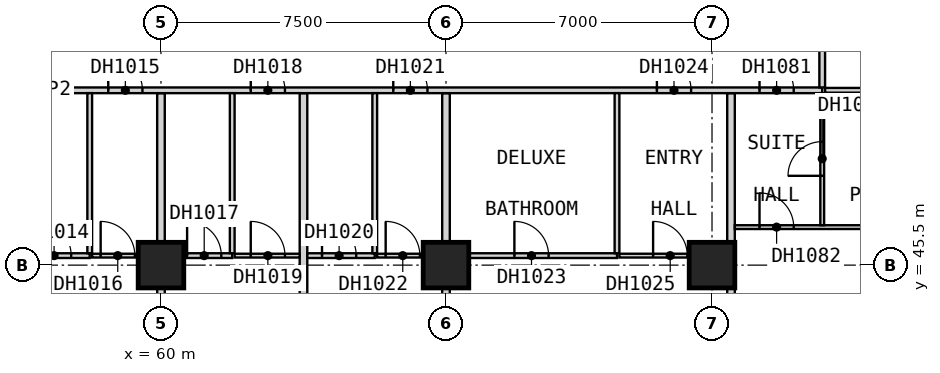
"""IFC4 building model, lengths in metres.
Left out: names, types, materials, properties, quantities, classifications, styles, units other than length and angle.
Written with IfcOpenShell. Run it as: python <this file> out.ifc"""

import sys

from ifc_helpers import new_model, si_unit, direction, frame, frame_2d, origin, origin_2d, place, context, subcontext, project, spatial, rectangle, extrude, element, fill, save


model = new_model("IFC4")
c1 = context("Model", 3, precision=1e-05, world=origin(), true_north=direction((0.0, 1.0)))
c2 = subcontext(c1, "Body", "Model", "MODEL_VIEW")
j1 = project(units=[si_unit("LENGTHUNIT", "METRE"), si_unit("PLANEANGLEUNIT", "RADIAN")], contexts=[c1])
p1 = place(None, origin())
s1 = spatial("IfcSite", under=j1, at=p1, CompositionType="ELEMENT")
p2 = place(p1, origin())
s2 = spatial("IfcBuilding", under=s1, at=p2, CompositionType="ELEMENT")
p3 = place(p2, frame((0.0, 0.0, 48.4)))
s3 = spatial("IfcBuildingStorey", under=s2, at=p3, CompositionType="ELEMENT", Elevation=48.4)
for number, where, z_axis, x_axis in (
    (1, (60.0, 45.5, 0.0), (0.0, 0.0, 1.0), (1.0, 0.0, 0.0)),
    (2, (67.5, 45.5, 0.0), (0.0, 0.0, 1.0), (1.0, 0.0, 0.0)),
    (3, (74.5, 45.5, 0.0), (0.0, 0.0, 1.0), (1.0, 0.0, 0.0)),
):
    element("IfcColumn", number, at=place(p3, frame(where, z_axis=z_axis, x_axis=x_axis)), inside=s3, PredefinedType="COLUMN", context=c2, shape_type="SweptSolid", body=[
        extrude(rectangle(XDim=1.2, YDim=1.2, at=origin_2d()), origin(), (0.0, 0.0, 1.0), 3.6),
    ])
p4 = place(p3, frame((60.0, 37.5, 0.0), z_axis=(0.0, 0.0, 1.0), x_axis=(0.0, 1.0, 0.0)))
e4 = element("IfcWall", 4, at=p4, inside=s3, PredefinedType="PARTITIONING", context=c2, shape_type="SweptSolid", body=[
    extrude(rectangle(XDim=12.525, YDim=0.2, at=frame_2d((6.262, 0.0))), origin(), (0.0, 0.0, 1.0), 3.35),
])
p5 = place(p3, frame((63.75, 38.31, 0.0), z_axis=(0.0, 0.0, 1.0), x_axis=(0.0, 1.0, 0.0)))
e5 = element("IfcWall", 5, at=p5, inside=s3, PredefinedType="PARTITIONING", context=c2, shape_type="SweptSolid", body=[
    extrude(rectangle(XDim=11.715, YDim=0.2, at=frame_2d((5.857, 0.0))), origin(), (0.0, 0.0, 1.0), 3.35),
])
p6 = place(p3, frame((67.5, 37.5, 0.0), z_axis=(0.0, 0.0, 1.0), x_axis=(0.0, 1.0, 0.0)))
e6 = element("IfcWall", 6, at=p6, inside=s3, PredefinedType="PARTITIONING", context=c2, shape_type="SweptSolid", body=[
    extrude(rectangle(XDim=12.525, YDim=0.2, at=frame_2d((6.262, 0.0))), origin(), (0.0, 0.0, 1.0), 3.35),
])
p7 = place(p3, frame((75.0, 38.31, 0.0), z_axis=(0.0, 0.0, 1.0), x_axis=(0.0, 1.0, 0.0)))
e7 = element("IfcWall", 7, at=p7, inside=s3, PredefinedType="PARTITIONING", context=c2, shape_type="SweptSolid", body=[
    extrude(rectangle(XDim=11.715, YDim=0.2, at=frame_2d((5.857, 0.0))), origin(), (0.0, 0.0, 1.0), 3.35),
])
p8 = place(p3, frame((33.75, 50.1, 0.0), z_axis=(0.0, 0.0, 1.0), x_axis=(1.0, 0.0, 0.0)))
e8 = element("IfcWall", 8, at=p8, inside=s3, PredefinedType="PARTITIONING", context=c2, shape_type="SweptSolid", body=[
    extrude(rectangle(XDim=43.65, YDim=0.15, at=frame_2d((21.825, 0.0))), origin(), (0.0, 0.0, 1.0), 3.35),
])
p9 = place(p8, frame((5.175, 0.0, 0.0)))
e9 = element("IfcOpeningElement", 9, at=p9, cuts=e8, PredefinedType="OPENING", context=c2, shape_type="SweptSolid", body=[
    extrude(rectangle(XDim=0.9, YDim=2.1, at=frame_2d((0.45, 1.05))), frame((0.0, 0.085, 0.0), z_axis=(0.0, -1.0, 0.0), x_axis=(1.0, 0.0, 0.0)), (0.0, 0.0, 1.0), 0.17),
])
p10 = place(p8, frame((13.05, 0.0, 0.0)))
e10 = element("IfcOpeningElement", 10, at=p10, cuts=e8, PredefinedType="OPENING", context=c2, shape_type="SweptSolid", body=[
    extrude(rectangle(XDim=0.9, YDim=2.1, at=frame_2d((0.45, 1.05))), frame((0.0, 0.085, 0.0), z_axis=(0.0, -1.0, 0.0), x_axis=(1.0, 0.0, 0.0)), (0.0, 0.0, 1.0), 0.17),
])
p11 = place(p8, frame((17.363, 0.0, 0.0)))
e11 = element("IfcOpeningElement", 11, at=p11, cuts=e8, PredefinedType="OPENING", context=c2, shape_type="SweptSolid", body=[
    extrude(rectangle(XDim=0.9, YDim=2.1, at=frame_2d((0.45, 1.05))), frame((0.0, 0.085, 0.0), z_axis=(0.0, -1.0, 0.0), x_axis=(1.0, 0.0, 0.0)), (0.0, 0.0, 1.0), 0.17),
])
p12 = place(p8, frame((21.113, 0.0, 0.0)))
e12 = element("IfcOpeningElement", 12, at=p12, cuts=e8, PredefinedType="OPENING", context=c2, shape_type="SweptSolid", body=[
    extrude(rectangle(XDim=0.9, YDim=2.1, at=frame_2d((0.45, 1.05))), frame((0.0, 0.085, 0.0), z_axis=(0.0, -1.0, 0.0), x_axis=(1.0, 0.0, 0.0)), (0.0, 0.0, 1.0), 0.17),
])
p13 = place(p8, frame((24.863, 0.0, 0.0)))
e13 = element("IfcOpeningElement", 13, at=p13, cuts=e8, PredefinedType="OPENING", context=c2, shape_type="SweptSolid", body=[
    extrude(rectangle(XDim=0.9, YDim=2.1, at=frame_2d((0.45, 1.05))), frame((0.0, 0.085, 0.0), z_axis=(0.0, -1.0, 0.0), x_axis=(1.0, 0.0, 0.0)), (0.0, 0.0, 1.0), 0.17),
])
p14 = place(p8, frame((28.613, 0.0, 0.0)))
e14 = element("IfcOpeningElement", 14, at=p14, cuts=e8, PredefinedType="OPENING", context=c2, shape_type="SweptSolid", body=[
    extrude(rectangle(XDim=0.9, YDim=2.1, at=frame_2d((0.45, 1.05))), frame((0.0, 0.085, 0.0), z_axis=(0.0, -1.0, 0.0), x_axis=(1.0, 0.0, 0.0)), (0.0, 0.0, 1.0), 0.17),
])
p15 = place(p8, frame((32.363, 0.0, 0.0)))
e15 = element("IfcOpeningElement", 15, at=p15, cuts=e8, PredefinedType="OPENING", context=c2, shape_type="SweptSolid", body=[
    extrude(rectangle(XDim=0.9, YDim=2.1, at=frame_2d((0.45, 1.05))), frame((0.0, 0.085, 0.0), z_axis=(0.0, -1.0, 0.0), x_axis=(1.0, 0.0, 0.0)), (0.0, 0.0, 1.0), 0.17),
])
p16 = place(p8, frame((39.3, 0.0, 0.0)))
e16 = element("IfcOpeningElement", 16, at=p16, cuts=e8, PredefinedType="OPENING", context=c2, shape_type="SweptSolid", body=[
    extrude(rectangle(XDim=0.9, YDim=2.1, at=frame_2d((0.45, 1.05))), frame((0.0, 0.085, 0.0), z_axis=(0.0, -1.0, 0.0), x_axis=(1.0, 0.0, 0.0)), (0.0, 0.0, 1.0), 0.17),
])
p17 = place(p8, frame((42.0, 0.0, 0.0)))
e17 = element("IfcOpeningElement", 17, at=p17, cuts=e8, PredefinedType="OPENING", context=c2, shape_type="SweptSolid", body=[
    extrude(rectangle(XDim=0.9, YDim=2.1, at=frame_2d((0.45, 1.05))), frame((0.0, 0.085, 0.0), z_axis=(0.0, -1.0, 0.0), x_axis=(1.0, 0.0, 0.0)), (0.0, 0.0, 1.0), 0.17),
])
p18 = place(p3, frame((77.4, 50.175, 0.0), z_axis=(0.0, 0.0, 1.0), x_axis=(0.0, 1.0, 0.0)))
e18 = element("IfcWall", 18, at=p18, inside=s3, PredefinedType="PARTITIONING", context=c2, shape_type="SweptSolid", body=[
    extrude(rectangle(XDim=42.15, YDim=0.15, at=frame_2d((21.075, 0.0))), origin(), (0.0, 0.0, 1.0), 3.35),
])
p19 = place(p18, frame((4.688, 0.0, 0.0)))
e19 = element("IfcOpeningElement", 19, at=p19, cuts=e18, PredefinedType="OPENING", context=c2, shape_type="SweptSolid", body=[
    extrude(rectangle(XDim=0.9, YDim=2.1, at=frame_2d((0.45, 1.05))), frame((0.0, 0.085, 0.0), z_axis=(0.0, -1.0, 0.0), x_axis=(1.0, 0.0, 0.0)), (0.0, 0.0, 1.0), 0.17),
])
p20 = place(p18, frame((8.438, 0.0, 0.0)))
e20 = element("IfcOpeningElement", 20, at=p20, cuts=e18, PredefinedType="OPENING", context=c2, shape_type="SweptSolid", body=[
    extrude(rectangle(XDim=0.9, YDim=2.1, at=frame_2d((0.45, 1.05))), frame((0.0, 0.085, 0.0), z_axis=(0.0, -1.0, 0.0), x_axis=(1.0, 0.0, 0.0)), (0.0, 0.0, 1.0), 0.17),
])
p21 = place(p18, frame((12.188, 0.0, 0.0)))
e21 = element("IfcOpeningElement", 21, at=p21, cuts=e18, PredefinedType="OPENING", context=c2, shape_type="SweptSolid", body=[
    extrude(rectangle(XDim=0.9, YDim=2.1, at=frame_2d((0.45, 1.05))), frame((0.0, 0.085, 0.0), z_axis=(0.0, -1.0, 0.0), x_axis=(1.0, 0.0, 0.0)), (0.0, 0.0, 1.0), 0.17),
])
p22 = place(p18, frame((15.938, 0.0, 0.0)))
e22 = element("IfcOpeningElement", 22, at=p22, cuts=e18, PredefinedType="OPENING", context=c2, shape_type="SweptSolid", body=[
    extrude(rectangle(XDim=0.9, YDim=2.1, at=frame_2d((0.45, 1.05))), frame((0.0, 0.085, 0.0), z_axis=(0.0, -1.0, 0.0), x_axis=(1.0, 0.0, 0.0)), (0.0, 0.0, 1.0), 0.17),
])
p23 = place(p18, frame((19.688, 0.0, 0.0)))
e23 = element("IfcOpeningElement", 23, at=p23, cuts=e18, PredefinedType="OPENING", context=c2, shape_type="SweptSolid", body=[
    extrude(rectangle(XDim=0.9, YDim=2.1, at=frame_2d((0.45, 1.05))), frame((0.0, 0.085, 0.0), z_axis=(0.0, -1.0, 0.0), x_axis=(1.0, 0.0, 0.0)), (0.0, 0.0, 1.0), 0.17),
])
p24 = place(p18, frame((23.438, 0.0, 0.0)))
e24 = element("IfcOpeningElement", 24, at=p24, cuts=e18, PredefinedType="OPENING", context=c2, shape_type="SweptSolid", body=[
    extrude(rectangle(XDim=0.9, YDim=2.1, at=frame_2d((0.45, 1.05))), frame((0.0, 0.085, 0.0), z_axis=(0.0, -1.0, 0.0), x_axis=(1.0, 0.0, 0.0)), (0.0, 0.0, 1.0), 0.17),
])
p25 = place(p18, frame((27.188, 0.0, 0.0)))
e25 = element("IfcOpeningElement", 25, at=p25, cuts=e18, PredefinedType="OPENING", context=c2, shape_type="SweptSolid", body=[
    extrude(rectangle(XDim=0.9, YDim=2.1, at=frame_2d((0.45, 1.05))), frame((0.0, 0.085, 0.0), z_axis=(0.0, -1.0, 0.0), x_axis=(1.0, 0.0, 0.0)), (0.0, 0.0, 1.0), 0.17),
])
p26 = place(p18, frame((30.938, 0.0, 0.0)))
e26 = element("IfcOpeningElement", 26, at=p26, cuts=e18, PredefinedType="OPENING", context=c2, shape_type="SweptSolid", body=[
    extrude(rectangle(XDim=0.9, YDim=2.1, at=frame_2d((0.45, 1.05))), frame((0.0, 0.085, 0.0), z_axis=(0.0, -1.0, 0.0), x_axis=(1.0, 0.0, 0.0)), (0.0, 0.0, 1.0), 0.17),
])
p27 = place(p18, frame((34.688, 0.0, 0.0)))
e27 = element("IfcOpeningElement", 27, at=p27, cuts=e18, PredefinedType="OPENING", context=c2, shape_type="SweptSolid", body=[
    extrude(rectangle(XDim=0.9, YDim=2.1, at=frame_2d((0.45, 1.05))), frame((0.0, 0.085, 0.0), z_axis=(0.0, -1.0, 0.0), x_axis=(1.0, 0.0, 0.0)), (0.0, 0.0, 1.0), 0.17),
])
p28 = place(p18, frame((38.438, 0.0, 0.0)))
e28 = element("IfcOpeningElement", 28, at=p28, cuts=e18, PredefinedType="OPENING", context=c2, shape_type="SweptSolid", body=[
    extrude(rectangle(XDim=0.9, YDim=2.1, at=frame_2d((0.45, 1.05))), frame((0.0, 0.085, 0.0), z_axis=(0.0, -1.0, 0.0), x_axis=(1.0, 0.0, 0.0)), (0.0, 0.0, 1.0), 0.17),
])
p29 = place(p3, frame((58.188, 45.75, 0.0), z_axis=(0.0, 0.0, 1.0), x_axis=(1.0, 0.0, 0.0)))
e29 = element("IfcWall", 29, at=p29, inside=s3, PredefinedType="PARTITIONING", context=c2, shape_type="SweptSolid", body=[
    extrude(rectangle(XDim=1.712, YDim=0.1, at=frame_2d((0.856, 0.0))), origin(), (0.0, 0.0, 1.0), 3.35),
])
p30 = place(p29, frame((0.225, 0.0, 0.0)))
e30 = element("IfcOpeningElement", 30, at=p30, cuts=e29, PredefinedType="OPENING", context=c2, shape_type="SweptSolid", body=[
    extrude(rectangle(XDim=0.9, YDim=2.1, at=frame_2d((0.45, 1.05))), frame((0.0, 0.06, 0.0), z_axis=(0.0, -1.0, 0.0), x_axis=(1.0, 0.0, 0.0)), (0.0, 0.0, 1.0), 0.12),
])
p31 = place(p3, frame((61.938, 45.75, 0.0), z_axis=(0.0, 0.0, 1.0), x_axis=(1.0, 0.0, 0.0)))
e31 = element("IfcWall", 31, at=p31, inside=s3, PredefinedType="PARTITIONING", context=c2, shape_type="SweptSolid", body=[
    extrude(rectangle(XDim=1.712, YDim=0.1, at=frame_2d((0.856, 0.0))), origin(), (0.0, 0.0, 1.0), 3.35),
])
p32 = place(p31, frame((0.425, 0.0, 0.0)))
e32 = element("IfcOpeningElement", 32, at=p32, cuts=e31, PredefinedType="OPENING", context=c2, shape_type="SweptSolid", body=[
    extrude(rectangle(XDim=0.9, YDim=2.1, at=frame_2d((0.45, 1.05))), frame((0.0, 0.06, 0.0), z_axis=(0.0, -1.0, 0.0), x_axis=(1.0, 0.0, 0.0)), (0.0, 0.0, 1.0), 0.12),
])
p33 = place(p3, frame((65.688, 45.75, 0.0), z_axis=(0.0, 0.0, 1.0), x_axis=(1.0, 0.0, 0.0)))
e33 = element("IfcWall", 33, at=p33, inside=s3, PredefinedType="PARTITIONING", context=c2, shape_type="SweptSolid", body=[
    extrude(rectangle(XDim=1.712, YDim=0.1, at=frame_2d((0.856, 0.0))), origin(), (0.0, 0.0, 1.0), 3.35),
])
p34 = place(p33, frame((0.225, 0.0, 0.0)))
e34 = element("IfcOpeningElement", 34, at=p34, cuts=e33, PredefinedType="OPENING", context=c2, shape_type="SweptSolid", body=[
    extrude(rectangle(XDim=0.9, YDim=2.1, at=frame_2d((0.45, 1.05))), frame((0.0, 0.06, 0.0), z_axis=(0.0, -1.0, 0.0), x_axis=(1.0, 0.0, 0.0)), (0.0, 0.0, 1.0), 0.12),
])
p35 = place(p3, frame((72.062, 45.75, 0.0), z_axis=(0.0, 0.0, 1.0), x_axis=(1.0, 0.0, 0.0)))
e35 = element("IfcWall", 35, at=p35, inside=s3, PredefinedType="PARTITIONING", context=c2, shape_type="SweptSolid", body=[
    extrude(rectangle(XDim=2.837, YDim=0.1, at=frame_2d((1.419, 0.0))), origin(), (0.0, 0.0, 1.0), 3.35),
])
p36 = place(p35, frame((0.887, 0.0, 0.0)))
e36 = element("IfcOpeningElement", 36, at=p36, cuts=e35, PredefinedType="OPENING", context=c2, shape_type="SweptSolid", body=[
    extrude(rectangle(XDim=0.9, YDim=2.1, at=frame_2d((0.45, 1.05))), frame((0.0, 0.06, 0.0), z_axis=(0.0, -1.0, 0.0), x_axis=(1.0, 0.0, 0.0)), (0.0, 0.0, 1.0), 0.12),
])
p37 = place(p3, frame((75.1, 46.5, 0.0), z_axis=(0.0, 0.0, 1.0), x_axis=(1.0, 0.0, 0.0)))
e37 = element("IfcWall", 37, at=p37, inside=s3, PredefinedType="PARTITIONING", context=c2, shape_type="SweptSolid", body=[
    extrude(rectangle(XDim=7.35, YDim=0.1, at=frame_2d((3.675, 0.0))), origin(), (0.0, 0.0, 1.0), 3.35),
])
p38 = place(p37, frame((0.65, 0.0, 0.0)))
e38 = element("IfcOpeningElement", 38, at=p38, cuts=e37, PredefinedType="OPENING", context=c2, shape_type="SweptSolid", body=[
    extrude(rectangle(XDim=0.9, YDim=2.1, at=frame_2d((0.45, 1.05))), frame((0.0, 0.06, 0.0), z_axis=(0.0, -1.0, 0.0), x_axis=(1.0, 0.0, 0.0)), (0.0, 0.0, 1.0), 0.12),
])
p39 = place(p3, frame((77.4, 46.55, 0.0), z_axis=(0.0, 0.0, 1.0), x_axis=(0.0, 1.0, 0.0)))
e39 = element("IfcWall", 39, at=p39, inside=s3, PredefinedType="PARTITIONING", context=c2, shape_type="SweptSolid", body=[
    extrude(rectangle(XDim=3.475, YDim=0.1, at=frame_2d((1.737, 0.0))), origin(), (0.0, 0.0, 1.0), 3.35),
])
p40 = place(p39, frame((1.3, 0.0, 0.0)))
e40 = element("IfcOpeningElement", 40, at=p40, cuts=e39, PredefinedType="OPENING", context=c2, shape_type="SweptSolid", body=[
    extrude(rectangle(XDim=0.9, YDim=2.1, at=frame_2d((0.45, 1.05))), frame((0.0, 0.06, 0.0), z_axis=(0.0, -1.0, 0.0), x_axis=(1.0, 0.0, 0.0)), (0.0, 0.0, 1.0), 0.12),
])
p41 = place(p3, frame((56.35, 45.75, 0.0), z_axis=(0.0, 0.0, 1.0), x_axis=(1.0, 0.0, 0.0)))
e41 = element("IfcWall", 41, at=p41, inside=s3, PredefinedType="PARTITIONING", context=c2, shape_type="SweptSolid", body=[
    extrude(rectangle(XDim=1.775, YDim=0.125, at=frame_2d((0.887, 0.0))), origin(), (0.0, 0.0, 1.0), 3.35),
])
p42 = place(p41, frame((0.387, 0.0, 0.0)))
e42 = element("IfcOpeningElement", 42, at=p42, cuts=e41, PredefinedType="OPENING", context=c2, shape_type="SweptSolid", body=[
    extrude(rectangle(XDim=0.9, YDim=2.1, at=frame_2d((0.45, 1.05))), frame((0.0, 0.073, 0.0), z_axis=(0.0, -1.0, 0.0), x_axis=(1.0, 0.0, 0.0)), (0.0, 0.0, 1.0), 0.145),
])
p43 = place(p3, frame((60.1, 45.75, 0.0), z_axis=(0.0, 0.0, 1.0), x_axis=(1.0, 0.0, 0.0)))
e43 = element("IfcWall", 43, at=p43, inside=s3, PredefinedType="PARTITIONING", context=c2, shape_type="SweptSolid", body=[
    extrude(rectangle(XDim=1.775, YDim=0.125, at=frame_2d((0.887, 0.0))), origin(), (0.0, 0.0, 1.0), 3.35),
])
p44 = place(p43, frame((0.587, 0.0, 0.0)))
e44 = element("IfcOpeningElement", 44, at=p44, cuts=e43, PredefinedType="OPENING", context=c2, shape_type="SweptSolid", body=[
    extrude(rectangle(XDim=0.9, YDim=2.1, at=frame_2d((0.45, 1.05))), frame((0.0, 0.073, 0.0), z_axis=(0.0, -1.0, 0.0), x_axis=(1.0, 0.0, 0.0)), (0.0, 0.0, 1.0), 0.145),
])
p45 = place(p3, frame((63.85, 45.75, 0.0), z_axis=(0.0, 0.0, 1.0), x_axis=(1.0, 0.0, 0.0)))
e45 = element("IfcWall", 45, at=p45, inside=s3, PredefinedType="PARTITIONING", context=c2, shape_type="SweptSolid", body=[
    extrude(rectangle(XDim=1.775, YDim=0.125, at=frame_2d((0.887, 0.0))), origin(), (0.0, 0.0, 1.0), 3.35),
])
p46 = place(p45, frame((0.387, 0.0, 0.0)))
e46 = element("IfcOpeningElement", 46, at=p46, cuts=e45, PredefinedType="OPENING", context=c2, shape_type="SweptSolid", body=[
    extrude(rectangle(XDim=0.9, YDim=2.1, at=frame_2d((0.45, 1.05))), frame((0.0, 0.073, 0.0), z_axis=(0.0, -1.0, 0.0), x_axis=(1.0, 0.0, 0.0)), (0.0, 0.0, 1.0), 0.145),
])
p47 = place(p3, frame((67.6, 45.75, 0.0), z_axis=(0.0, 0.0, 1.0), x_axis=(1.0, 0.0, 0.0)))
e47 = element("IfcWall", 47, at=p47, inside=s3, PredefinedType="PARTITIONING", context=c2, shape_type="SweptSolid", body=[
    extrude(rectangle(XDim=4.4, YDim=0.125, at=frame_2d((2.2, 0.0))), origin(), (0.0, 0.0, 1.0), 3.35),
])
p48 = place(p47, frame((1.7, 0.0, 0.0)))
e48 = element("IfcOpeningElement", 48, at=p48, cuts=e47, PredefinedType="OPENING", context=c2, shape_type="SweptSolid", body=[
    extrude(rectangle(XDim=0.9, YDim=2.1, at=frame_2d((0.45, 1.05))), frame((0.0, 0.073, 0.0), z_axis=(0.0, -1.0, 0.0), x_axis=(1.0, 0.0, 0.0)), (0.0, 0.0, 1.0), 0.145),
])
p49 = place(p3, frame((77.475, 50.1, 0.0), z_axis=(0.0, 0.0, 1.0), x_axis=(1.0, 0.0, 0.0)))
e49 = element("IfcWall", 49, at=p49, inside=s3, PredefinedType="PARTITIONING", context=c2, shape_type="SweptSolid", body=[
    extrude(rectangle(XDim=5.025, YDim=0.125, at=frame_2d((2.512, 0.0))), origin(), (0.0, 0.0, 1.0), 3.35),
])
for number, where, z_axis, x_axis in (
    (50, (58.125, 45.812, 0.0), (0.0, 0.0, 1.0), (0.0, 1.0, 0.0)),
    (51, (61.875, 45.812, 0.0), (0.0, 0.0, 1.0), (0.0, 1.0, 0.0)),
    (52, (65.625, 45.812, 0.0), (0.0, 0.0, 1.0), (0.0, 1.0, 0.0)),
    (53, (72.0, 45.812, 0.0), (0.0, 0.0, 1.0), (0.0, 1.0, 0.0)),
):
    element("IfcWall", number, at=place(p3, frame(where, z_axis=z_axis, x_axis=x_axis)), inside=s3, PredefinedType="PARTITIONING", context=c2, shape_type="SweptSolid", body=[
        extrude(rectangle(XDim=4.212, YDim=0.125, at=frame_2d((2.106, 0.0))), origin(), (0.0, 0.0, 1.0), 3.35),
    ])
p50 = place(p42, origin())
e54 = element("IfcDoor", 54, at=p50, inside=s3, OperationType="SINGLE_SWING_LEFT", PredefinedType="DOOR", context=c2, shape_type="SweptSolid", body=[
    extrude(rectangle(XDim=0.9, YDim=2.1, at=frame_2d((0.45, 1.05))), frame((0.0, 0.025, 0.0), z_axis=(0.0, -1.0, 0.0), x_axis=(1.0, 0.0, 0.0)), (0.0, 0.0, 1.0), 0.05),
])
fill(e42, e54)
p51 = place(p13, origin())
e55 = element("IfcDoor", 55, at=p51, inside=s3, OperationType="SINGLE_SWING_RIGHT", PredefinedType="DOOR", context=c2, shape_type="SweptSolid", body=[
    extrude(rectangle(XDim=0.9, YDim=2.1, at=frame_2d((0.45, 1.05))), frame((0.0, 0.025, 0.0), z_axis=(0.0, -1.0, 0.0), x_axis=(1.0, 0.0, 0.0)), (0.0, 0.0, 1.0), 0.05),
])
fill(e13, e55)
p52 = place(p30, origin())
e56 = element("IfcDoor", 56, at=p52, inside=s3, OperationType="SINGLE_SWING_LEFT", PredefinedType="DOOR", context=c2, shape_type="SweptSolid", body=[
    extrude(rectangle(XDim=0.9, YDim=2.1, at=frame_2d((0.45, 1.05))), frame((0.0, 0.025, 0.0), z_axis=(0.0, -1.0, 0.0), x_axis=(1.0, 0.0, 0.0)), (0.0, 0.0, 1.0), 0.05),
])
fill(e30, e56)
p53 = place(p44, origin())
e57 = element("IfcDoor", 57, at=p53, inside=s3, OperationType="SINGLE_SWING_RIGHT", PredefinedType="DOOR", context=c2, shape_type="SweptSolid", body=[
    extrude(rectangle(XDim=0.9, YDim=2.1, at=frame_2d((0.45, 1.05))), frame((0.0, 0.025, 0.0), z_axis=(0.0, -1.0, 0.0), x_axis=(1.0, 0.0, 0.0)), (0.0, 0.0, 1.0), 0.05),
])
fill(e44, e57)
p54 = place(p14, origin())
e58 = element("IfcDoor", 58, at=p54, inside=s3, OperationType="SINGLE_SWING_RIGHT", PredefinedType="DOOR", context=c2, shape_type="SweptSolid", body=[
    extrude(rectangle(XDim=0.9, YDim=2.1, at=frame_2d((0.45, 1.05))), frame((0.0, 0.025, 0.0), z_axis=(0.0, -1.0, 0.0), x_axis=(1.0, 0.0, 0.0)), (0.0, 0.0, 1.0), 0.05),
])
fill(e14, e58)
p55 = place(p32, origin())
e59 = element("IfcDoor", 59, at=p55, inside=s3, OperationType="SINGLE_SWING_LEFT", PredefinedType="DOOR", context=c2, shape_type="SweptSolid", body=[
    extrude(rectangle(XDim=0.9, YDim=2.1, at=frame_2d((0.45, 1.05))), frame((0.0, 0.025, 0.0), z_axis=(0.0, -1.0, 0.0), x_axis=(1.0, 0.0, 0.0)), (0.0, 0.0, 1.0), 0.05),
])
fill(e32, e59)
p56 = place(p46, origin())
e60 = element("IfcDoor", 60, at=p56, inside=s3, OperationType="SINGLE_SWING_LEFT", PredefinedType="DOOR", context=c2, shape_type="SweptSolid", body=[
    extrude(rectangle(XDim=0.9, YDim=2.1, at=frame_2d((0.45, 1.05))), frame((0.0, 0.025, 0.0), z_axis=(0.0, -1.0, 0.0), x_axis=(1.0, 0.0, 0.0)), (0.0, 0.0, 1.0), 0.05),
])
fill(e46, e60)
p57 = place(p15, origin())
e61 = element("IfcDoor", 61, at=p57, inside=s3, OperationType="SINGLE_SWING_RIGHT", PredefinedType="DOOR", context=c2, shape_type="SweptSolid", body=[
    extrude(rectangle(XDim=0.9, YDim=2.1, at=frame_2d((0.45, 1.05))), frame((0.0, 0.025, 0.0), z_axis=(0.0, -1.0, 0.0), x_axis=(1.0, 0.0, 0.0)), (0.0, 0.0, 1.0), 0.05),
])
fill(e15, e61)
p58 = place(p34, origin())
e62 = element("IfcDoor", 62, at=p58, inside=s3, OperationType="SINGLE_SWING_LEFT", PredefinedType="DOOR", context=c2, shape_type="SweptSolid", body=[
    extrude(rectangle(XDim=0.9, YDim=2.1, at=frame_2d((0.45, 1.05))), frame((0.0, 0.025, 0.0), z_axis=(0.0, -1.0, 0.0), x_axis=(1.0, 0.0, 0.0)), (0.0, 0.0, 1.0), 0.05),
])
fill(e34, e62)
p59 = place(p48, origin())
e63 = element("IfcDoor", 63, at=p59, inside=s3, OperationType="SINGLE_SWING_LEFT", PredefinedType="DOOR", context=c2, shape_type="SweptSolid", body=[
    extrude(rectangle(XDim=0.9, YDim=2.1, at=frame_2d((0.45, 1.05))), frame((0.0, 0.025, 0.0), z_axis=(0.0, -1.0, 0.0), x_axis=(1.0, 0.0, 0.0)), (0.0, 0.0, 1.0), 0.05),
])
fill(e48, e63)
p60 = place(p16, origin())
e64 = element("IfcDoor", 64, at=p60, inside=s3, OperationType="SINGLE_SWING_RIGHT", PredefinedType="DOOR", context=c2, shape_type="SweptSolid", body=[
    extrude(rectangle(XDim=0.9, YDim=2.1, at=frame_2d((0.45, 1.05))), frame((0.0, 0.025, 0.0), z_axis=(0.0, -1.0, 0.0), x_axis=(1.0, 0.0, 0.0)), (0.0, 0.0, 1.0), 0.05),
])
fill(e16, e64)
p61 = place(p36, origin())
e65 = element("IfcDoor", 65, at=p61, inside=s3, OperationType="SINGLE_SWING_LEFT", PredefinedType="DOOR", context=c2, shape_type="SweptSolid", body=[
    extrude(rectangle(XDim=0.9, YDim=2.1, at=frame_2d((0.45, 1.05))), frame((0.0, 0.025, 0.0), z_axis=(0.0, -1.0, 0.0), x_axis=(1.0, 0.0, 0.0)), (0.0, 0.0, 1.0), 0.05),
])
fill(e36, e65)
p62 = place(p17, origin())
e66 = element("IfcDoor", 66, at=p62, inside=s3, OperationType="SINGLE_SWING_LEFT", PredefinedType="DOOR", context=c2, shape_type="SweptSolid", body=[
    extrude(rectangle(XDim=0.9, YDim=2.1, at=frame_2d((0.45, 1.05))), frame((0.0, 0.025, 0.0), z_axis=(0.0, -1.0, 0.0), x_axis=(1.0, 0.0, 0.0)), (0.0, 0.0, 1.0), 0.05),
])
fill(e17, e66)
p63 = place(p38, origin())
e67 = element("IfcDoor", 67, at=p63, inside=s3, OperationType="SINGLE_SWING_RIGHT", PredefinedType="DOOR", context=c2, shape_type="SweptSolid", body=[
    extrude(rectangle(XDim=0.9, YDim=2.1, at=frame_2d((0.45, 1.05))), frame((0.0, 0.025, 0.0), z_axis=(0.0, -1.0, 0.0), x_axis=(1.0, 0.0, 0.0)), (0.0, 0.0, 1.0), 0.05),
])
fill(e38, e67)
p64 = place(p40, origin())
e68 = element("IfcDoor", 68, at=p64, inside=s3, OperationType="SINGLE_SWING_RIGHT", PredefinedType="DOOR", context=c2, shape_type="SweptSolid", body=[
    extrude(rectangle(XDim=0.9, YDim=2.1, at=frame_2d((0.45, 1.05))), frame((0.0, 0.025, 0.0), z_axis=(0.0, -1.0, 0.0), x_axis=(1.0, 0.0, 0.0)), (0.0, 0.0, 1.0), 0.05),
])
fill(e40, e68)
save(model, sys.argv[1])
